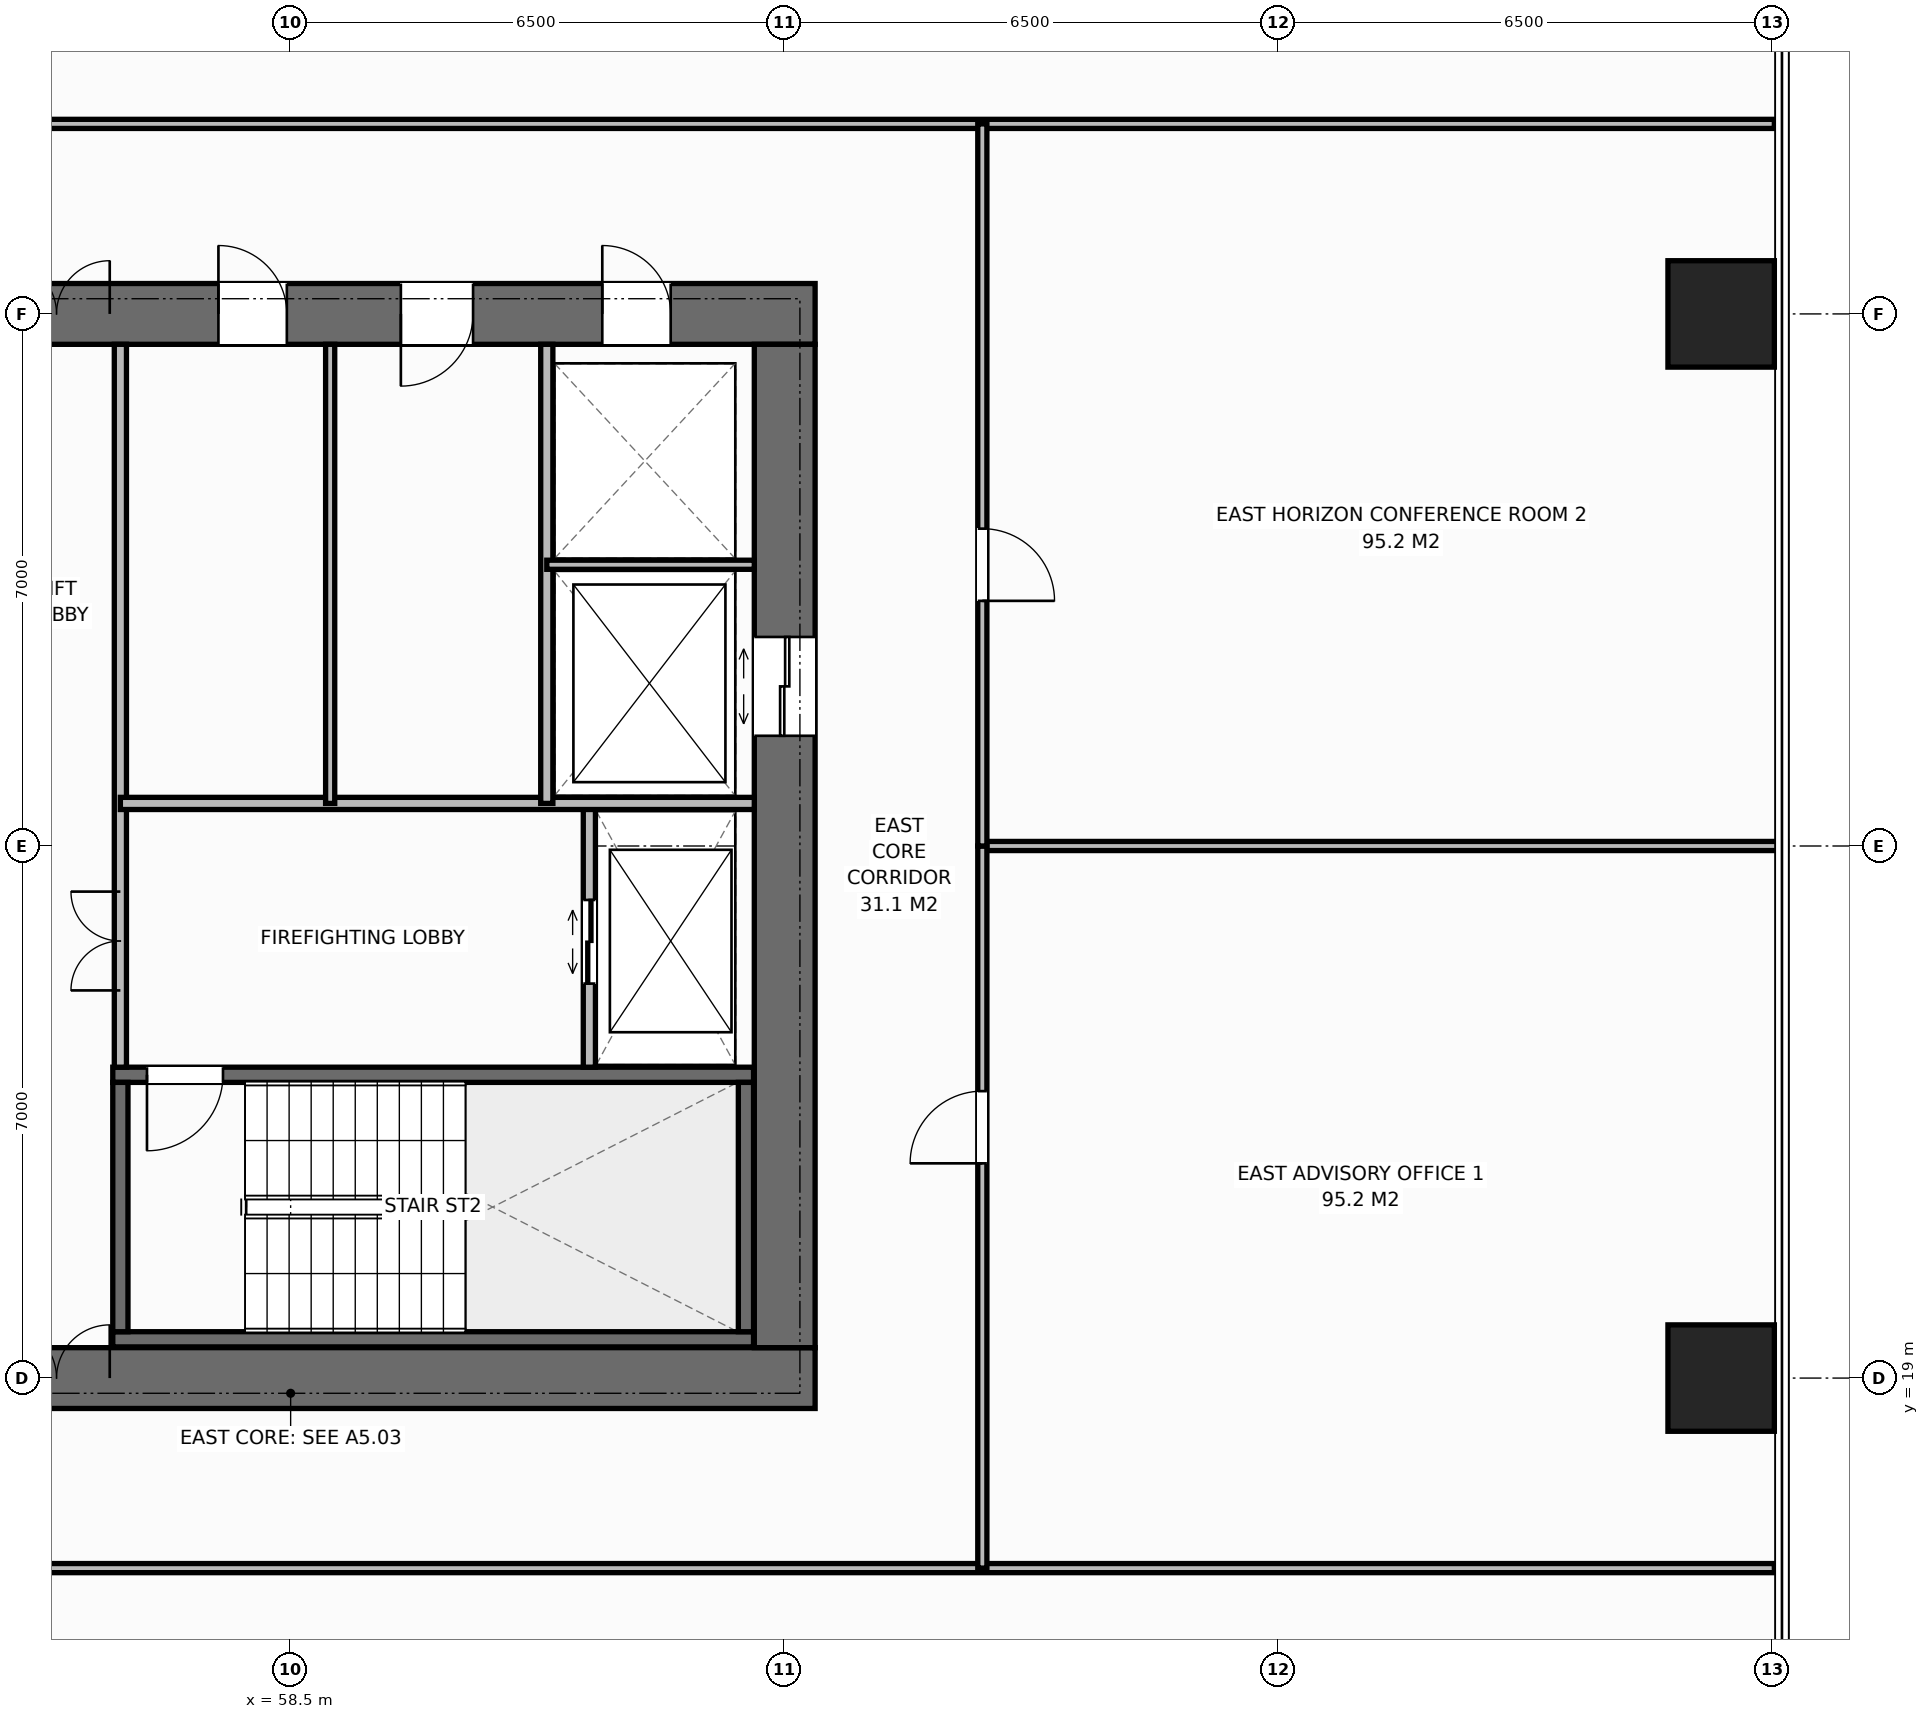
"""IFC4 building model, lengths in metres.
Left out: names, types, materials, properties, quantities, classifications, styles, units other than length and angle.
Written with IfcOpenShell. Run it as: python <this file> out.ifc"""

import sys

from ifc_helpers import new_model, si_unit, direction, frame, frame_2d, origin, origin_2d, place, context, subcontext, project, spatial, rectangle, extrude, element, fill, save


model = new_model("IFC4")
c1 = context("Model", 3, precision=1e-05, world=origin(), true_north=direction((0.0, 1.0)))
c2 = subcontext(c1, "Body", "Model", "MODEL_VIEW")
j1 = project(units=[si_unit("LENGTHUNIT", "METRE"), si_unit("PLANEANGLEUNIT", "RADIAN")], contexts=[c1])
p1 = place(None, origin())
s1 = spatial("IfcSite", under=j1, at=p1, CompositionType="ELEMENT")
p2 = place(p1, origin())
s2 = spatial("IfcBuilding", under=s1, at=p2, CompositionType="ELEMENT")
p3 = place(p2, frame((0.0, 0.0, 35.4)))
s3 = spatial("IfcBuildingStorey", under=s2, at=p3, CompositionType="ELEMENT", Elevation=35.4)
p4 = place(p3, frame((51.6, 19.0, 0.0), z_axis=(0.0, 0.0, 1.0), x_axis=(1.0, 0.0, 0.0)))
e1 = element("IfcWall", 1, at=p4, inside=s3, PredefinedType="SHEAR", context=c2, shape_type="SweptSolid", body=[
    extrude(rectangle(XDim=13.8, YDim=0.8, at=frame_2d((6.9, 0.0))), origin(), (0.0, 0.0, 1.0), 3.8),
])
p5 = place(p4, frame((3.12, 0.0, 0.0)))
e2 = element("IfcOpeningElement", 2, at=p5, cuts=e1, PredefinedType="OPENING", context=c2, shape_type="SweptSolid", body=[
    extrude(rectangle(XDim=1.4, YDim=2.2, at=frame_2d((0.7, 1.1))), frame((0.0, 0.41, 0.0), z_axis=(0.0, -1.0, 0.0), x_axis=(1.0, 0.0, 0.0)), (0.0, 0.0, 1.0), 0.82),
])
p6 = place(p3, frame((51.6, 33.0, 0.0), z_axis=(0.0, 0.0, 1.0), x_axis=(1.0, 0.0, 0.0)))
e3 = element("IfcWall", 3, at=p6, inside=s3, PredefinedType="SHEAR", context=c2, shape_type="SweptSolid", body=[
    extrude(rectangle(XDim=13.8, YDim=0.8, at=frame_2d((6.9, 0.0))), origin(), (0.0, 0.0, 1.0), 3.8),
])
p7 = place(p6, frame((3.12, 0.0, 0.0)))
e4 = element("IfcOpeningElement", 4, at=p7, cuts=e3, PredefinedType="OPENING", context=c2, shape_type="SweptSolid", body=[
    extrude(rectangle(XDim=1.4, YDim=2.2, at=frame_2d((0.7, 1.1))), frame((0.0, 0.41, 0.0), z_axis=(0.0, -1.0, 0.0), x_axis=(1.0, 0.0, 0.0)), (0.0, 0.0, 1.0), 0.82),
])
p8 = place(p6, frame((11.0, 0.0, 0.0)))
e5 = element("IfcOpeningElement", 5, at=p8, cuts=e3, PredefinedType="OPENING", context=c2, shape_type="SweptSolid", body=[
    extrude(rectangle(XDim=0.9, YDim=2.15, at=frame_2d((0.45, 1.075))), frame((0.0, 0.41, 0.0), z_axis=(0.0, -1.0, 0.0), x_axis=(1.0, 0.0, 0.0)), (0.0, 0.0, 1.0), 0.82),
])
p9 = place(p6, frame((5.95, 0.0, 0.0)))
e6 = element("IfcOpeningElement", 6, at=p9, cuts=e3, PredefinedType="OPENING", context=c2, shape_type="SweptSolid", body=[
    extrude(rectangle(XDim=0.9, YDim=2.15, at=frame_2d((0.45, 1.075))), frame((0.0, 0.41, 0.0), z_axis=(0.0, -1.0, 0.0), x_axis=(1.0, 0.0, 0.0)), (0.0, 0.0, 1.0), 0.82),
])
p10 = place(p6, frame((8.35, 0.0, 0.0)))
e7 = element("IfcOpeningElement", 7, at=p10, cuts=e3, PredefinedType="OPENING", context=c2, shape_type="SweptSolid", body=[
    extrude(rectangle(XDim=0.95, YDim=2.15, at=frame_2d((0.475, 1.075))), frame((0.0, 0.41, 0.0), z_axis=(0.0, -1.0, 0.0), x_axis=(1.0, 0.0, 0.0)), (0.0, 0.0, 1.0), 0.82),
])
p11 = place(p3, frame((65.0, 19.4, 0.0), z_axis=(0.0, 0.0, 1.0), x_axis=(0.0, 1.0, 0.0)))
e8 = element("IfcWall", 8, at=p11, inside=s3, PredefinedType="SHEAR", context=c2, shape_type="SweptSolid", body=[
    extrude(rectangle(XDim=13.2, YDim=0.8, at=frame_2d((6.6, 0.0))), origin(), (0.0, 0.0, 1.0), 3.8),
])
p12 = place(p11, frame((8.05, 0.0, 0.0)))
e9 = element("IfcOpeningElement", 9, at=p12, cuts=e8, PredefinedType="OPENING", context=c2, shape_type="SweptSolid", body=[
    extrude(rectangle(XDim=1.3, YDim=2.2, at=frame_2d((0.65, 1.1))), frame((0.0, 0.41, 0.0), z_axis=(0.0, -1.0, 0.0), x_axis=(1.0, 0.0, 0.0)), (0.0, 0.0, 1.0), 0.82),
])
p13 = place(p3, frame((56.16, 19.51, 0.0), z_axis=(0.0, 0.0, 1.0), x_axis=(1.0, 0.0, 0.0)))
e10 = element("IfcWall", 10, at=p13, inside=s3, PredefinedType="SHEAR", context=c2, shape_type="SweptSolid", body=[
    extrude(rectangle(XDim=8.43, YDim=0.2, at=frame_2d((4.215, 0.0))), origin(), (0.0, 0.0, 1.0), 3.8),
])
p14 = place(p3, frame((56.16, 22.99, 0.0), z_axis=(0.0, 0.0, 1.0), x_axis=(1.0, 0.0, 0.0)))
e11 = element("IfcWall", 11, at=p14, inside=s3, PredefinedType="SHEAR", context=c2, shape_type="SweptSolid", body=[
    extrude(rectangle(XDim=8.43, YDim=0.2, at=frame_2d((4.215, 0.0))), origin(), (0.0, 0.0, 1.0), 3.8),
])
p15 = place(p14, frame((0.45, 0.0, 0.0)))
e12 = element("IfcOpeningElement", 12, at=p15, cuts=e11, PredefinedType="OPENING", context=c2, shape_type="SweptSolid", body=[
    extrude(rectangle(XDim=1.0, YDim=2.15, at=frame_2d((0.5, 1.075))), frame((0.0, 0.11, 0.0), z_axis=(0.0, -1.0, 0.0), x_axis=(1.0, 0.0, 0.0)), (0.0, 0.0, 1.0), 0.22),
])
for number, where, z_axis, x_axis in (
    (13, (56.26, 19.61, 0.0), (0.0, 0.0, 1.0), (0.0, 1.0, 0.0)),
    (14, (64.49, 19.61, 0.0), (0.0, 0.0, 1.0), (0.0, 1.0, 0.0)),
):
    element("IfcWall", number, at=place(p3, frame(where, z_axis=z_axis, x_axis=x_axis)), inside=s3, PredefinedType="SHEAR", context=c2, shape_type="SweptSolid", body=[
        extrude(rectangle(XDim=3.28, YDim=0.2, at=frame_2d((1.64, 0.0))), origin(), (0.0, 0.0, 1.0), 3.8),
    ])
for number, where, z_axis, x_axis in (
    (15, (77.32, 19.0, 0.0), (0.0, 0.0, 1.0), (1.0, 0.0, 0.0)),
    (16, (77.32, 33.0, 0.0), (0.0, 0.0, 1.0), (1.0, 0.0, 0.0)),
):
    element("IfcColumn", number, at=place(p3, frame(where, z_axis=z_axis, x_axis=x_axis)), inside=s3, PredefinedType="COLUMN", context=c2, shape_type="SweptSolid", body=[
        extrude(rectangle(XDim=1.4, YDim=1.4, at=origin_2d()), origin(), (0.0, 0.0, 1.0), 3.8),
    ])
p16 = place(p3, frame((56.26, 23.09, 0.0), z_axis=(0.0, 0.0, 1.0), x_axis=(0.0, 1.0, 0.0)))
e17 = element("IfcWall", 17, at=p16, inside=s3, PredefinedType="STANDARD", context=c2, shape_type="SweptSolid", body=[
    extrude(rectangle(XDim=9.51, YDim=0.16, at=frame_2d((4.755, 0.0))), origin(), (0.0, 0.0, 1.0), 3.55),
])
p17 = place(p16, frame((1.01, 0.0, 0.0)))
e18 = element("IfcOpeningElement", 18, at=p17, cuts=e17, PredefinedType="OPENING", context=c2, shape_type="SweptSolid", body=[
    extrude(rectangle(XDim=1.3, YDim=2.2, at=frame_2d((0.65, 1.1))), frame((0.0, 0.09, 0.0), z_axis=(0.0, -1.0, 0.0), x_axis=(1.0, 0.0, 0.0)), (0.0, 0.0, 1.0), 0.18),
])
p18 = place(p3, frame((62.43, 23.09, 0.0), z_axis=(0.0, 0.0, 1.0), x_axis=(0.0, 1.0, 0.0)))
e19 = element("IfcWall", 19, at=p18, inside=s3, PredefinedType="STANDARD", context=c2, shape_type="SweptSolid", body=[
    extrude(rectangle(XDim=3.47, YDim=0.16, at=frame_2d((1.735, 0.0))), origin(), (0.0, 0.0, 1.0), 3.55),
])
p19 = place(p18, frame((1.1, 0.0, 0.0)))
e20 = element("IfcOpeningElement", 20, at=p19, cuts=e19, PredefinedType="OPENING", context=c2, shape_type="SweptSolid", body=[
    extrude(rectangle(XDim=1.1, YDim=2.2, at=frame_2d((0.55, 1.1))), frame((0.0, 0.09, 0.0), z_axis=(0.0, -1.0, 0.0), x_axis=(1.0, 0.0, 0.0)), (0.0, 0.0, 1.0), 0.18),
])
p20 = place(p3, frame((56.26, 26.56, 0.0), z_axis=(0.0, 0.0, 1.0), x_axis=(1.0, 0.0, 0.0)))
e21 = element("IfcWall", 21, at=p20, inside=s3, PredefinedType="STANDARD", context=c2, shape_type="SweptSolid", body=[
    extrude(rectangle(XDim=8.34, YDim=0.16, at=frame_2d((4.17, 0.0))), origin(), (0.0, 0.0, 1.0), 3.55),
])
p21 = place(p3, frame((61.87, 26.56, 0.0), z_axis=(0.0, 0.0, 1.0), x_axis=(0.0, 1.0, 0.0)))
e22 = element("IfcWall", 22, at=p21, inside=s3, PredefinedType="STANDARD", context=c2, shape_type="SweptSolid", body=[
    extrude(rectangle(XDim=6.04, YDim=0.16, at=frame_2d((3.02, 0.0))), origin(), (0.0, 0.0, 1.0), 3.55),
])
p22 = place(p3, frame((61.87, 29.7, 0.0), z_axis=(0.0, 0.0, 1.0), x_axis=(1.0, 0.0, 0.0)))
e23 = element("IfcWall", 23, at=p22, inside=s3, PredefinedType="PARTITIONING", context=c2, shape_type="SweptSolid", body=[
    extrude(rectangle(XDim=2.73, YDim=0.12, at=frame_2d((1.365, 0.0))), origin(), (0.0, 0.0, 1.0), 3.55),
])
p23 = place(p3, frame((59.02, 26.56, 0.0), z_axis=(0.0, 0.0, 1.0), x_axis=(0.0, 1.0, 0.0)))
e24 = element("IfcWall", 24, at=p23, inside=s3, PredefinedType="PARTITIONING", context=c2, shape_type="SweptSolid", body=[
    extrude(rectangle(XDim=6.04, YDim=0.12, at=frame_2d((3.02, 0.0))), origin(), (0.0, 0.0, 1.0), 3.55),
])
p24 = place(p3, frame((32.46, 35.5, 0.0), z_axis=(0.0, 0.0, 1.0), x_axis=(1.0, 0.0, 0.0)))
e25 = element("IfcWall", 25, at=p24, inside=s3, PredefinedType="PARTITIONING", context=c2, shape_type="SweptSolid", body=[
    extrude(rectangle(XDim=45.56, YDim=0.12, at=frame_2d((22.78, 0.0))), origin(), (0.0, 0.0, 1.0), 3.55),
])
p25 = place(p24, frame((17.095, 0.0, 0.0)))
e26 = element("IfcOpeningElement", 26, at=p25, cuts=e25, PredefinedType="OPENING", context=c2, shape_type="SweptSolid", body=[
    extrude(rectangle(XDim=0.95, YDim=2.15, at=frame_2d((0.475, 1.075))), frame((0.0, 0.07, 0.0), z_axis=(0.0, -1.0, 0.0), x_axis=(1.0, 0.0, 0.0)), (0.0, 0.0, 1.0), 0.14),
])
p26 = place(p3, frame((40.043, 16.5, 0.0), z_axis=(0.0, 0.0, 1.0), x_axis=(1.0, 0.0, 0.0)))
e27 = element("IfcWall", 27, at=p26, inside=s3, PredefinedType="PARTITIONING", context=c2, shape_type="SweptSolid", body=[
    extrude(rectangle(XDim=37.977, YDim=0.12, at=frame_2d((18.988, 0.0))), origin(), (0.0, 0.0, 1.0), 3.55),
])
p27 = place(p26, frame((13.303, 0.0, 0.0)))
e28 = element("IfcOpeningElement", 28, at=p27, cuts=e27, PredefinedType="OPENING", context=c2, shape_type="SweptSolid", body=[
    extrude(rectangle(XDim=0.95, YDim=2.15, at=frame_2d((0.475, 1.075))), frame((0.0, 0.07, 0.0), z_axis=(0.0, -1.0, 0.0), x_axis=(1.0, 0.0, 0.0)), (0.0, 0.0, 1.0), 0.14),
])
p28 = place(p3, frame((67.6, 26.0, 0.0), z_axis=(0.0, 0.0, 1.0), x_axis=(1.0, 0.0, 0.0)))
e29 = element("IfcWall", 29, at=p28, inside=s3, PredefinedType="PARTITIONING", context=c2, shape_type="SweptSolid", body=[
    extrude(rectangle(XDim=10.58, YDim=0.12, at=frame_2d((5.29, 0.0))), origin(), (0.0, 0.0, 1.0), 3.55),
])
p29 = place(p3, frame((67.6, 16.5, 0.0), z_axis=(0.0, 0.0, 1.0), x_axis=(0.0, 1.0, 0.0)))
e30 = element("IfcWall", 30, at=p29, inside=s3, PredefinedType="PARTITIONING", context=c2, shape_type="SweptSolid", body=[
    extrude(rectangle(XDim=9.5, YDim=0.12, at=frame_2d((4.75, 0.0))), origin(), (0.0, 0.0, 1.0), 3.55),
])
p30 = place(p29, frame((5.325, 0.0, 0.0)))
e31 = element("IfcOpeningElement", 31, at=p30, cuts=e30, PredefinedType="OPENING", context=c2, shape_type="SweptSolid", body=[
    extrude(rectangle(XDim=0.95, YDim=2.15, at=frame_2d((0.475, 1.075))), frame((0.0, 0.07, 0.0), z_axis=(0.0, -1.0, 0.0), x_axis=(1.0, 0.0, 0.0)), (0.0, 0.0, 1.0), 0.14),
])
p31 = place(p3, frame((67.6, 26.0, 0.0), z_axis=(0.0, 0.0, 1.0), x_axis=(0.0, 1.0, 0.0)))
e32 = element("IfcWall", 32, at=p31, inside=s3, PredefinedType="PARTITIONING", context=c2, shape_type="SweptSolid", body=[
    extrude(rectangle(XDim=9.5, YDim=0.12, at=frame_2d((4.75, 0.0))), origin(), (0.0, 0.0, 1.0), 3.55),
])
p32 = place(p31, frame((3.225, 0.0, 0.0)))
e33 = element("IfcOpeningElement", 33, at=p32, cuts=e32, PredefinedType="OPENING", context=c2, shape_type="SweptSolid", body=[
    extrude(rectangle(XDim=0.95, YDim=2.15, at=frame_2d((0.475, 1.075))), frame((0.0, 0.07, 0.0), z_axis=(0.0, -1.0, 0.0), x_axis=(1.0, 0.0, 0.0)), (0.0, 0.0, 1.0), 0.14),
])
p33 = place(p5, origin())
e34 = element("IfcDoor", 34, at=p33, inside=s3, OperationType="DOUBLE_DOOR_SINGLE_SWING", PredefinedType="DOOR", context=c2, shape_type="SweptSolid", body=[
    extrude(rectangle(XDim=1.4, YDim=2.2, at=frame_2d((0.7, 1.1))), frame((0.0, 0.125, 0.0), z_axis=(0.0, -1.0, 0.0), x_axis=(1.0, 0.0, 0.0)), (0.0, 0.0, 1.0), 0.05),
])
fill(e2, e34)
p34 = place(p7, origin())
e35 = element("IfcDoor", 35, at=p34, inside=s3, OperationType="DOUBLE_DOOR_SINGLE_SWING", PredefinedType="DOOR", context=c2, shape_type="SweptSolid", body=[
    extrude(rectangle(XDim=1.4, YDim=2.2, at=frame_2d((0.7, 1.1))), frame((0.0, -0.075, 0.0), z_axis=(0.0, -1.0, 0.0), x_axis=(1.0, 0.0, 0.0)), (0.0, 0.0, 1.0), 0.05),
])
fill(e4, e35)
p35 = place(p15, origin())
e36 = element("IfcDoor", 36, at=p35, inside=s3, OperationType="SINGLE_SWING_RIGHT", PredefinedType="DOOR", context=c2, shape_type="SweptSolid", body=[
    extrude(rectangle(XDim=1.0, YDim=2.15, at=frame_2d((0.5, 1.075))), frame((0.0, 0.025, 0.0), z_axis=(0.0, -1.0, 0.0), x_axis=(1.0, 0.0, 0.0)), (0.0, 0.0, 1.0), 0.05),
])
fill(e12, e36)
p36 = place(p19, origin())
e37 = element("IfcDoor", 37, at=p36, inside=s3, OperationType="DOUBLE_DOOR_SLIDING", PredefinedType="DOOR", context=c2, shape_type="SweptSolid", body=[
    extrude(rectangle(XDim=1.1, YDim=2.2, at=frame_2d((0.55, 1.1))), frame((0.0, 0.025, 0.0), z_axis=(0.0, -1.0, 0.0), x_axis=(1.0, 0.0, 0.0)), (0.0, 0.0, 1.0), 0.05),
])
fill(e20, e37)
p37 = place(p17, origin())
e38 = element("IfcDoor", 38, at=p37, inside=s3, OperationType="DOUBLE_DOOR_SINGLE_SWING", PredefinedType="DOOR", context=c2, shape_type="SweptSolid", body=[
    extrude(rectangle(XDim=1.3, YDim=2.2, at=frame_2d((0.65, 1.1))), frame((0.0, 0.025, 0.0), z_axis=(0.0, -1.0, 0.0), x_axis=(1.0, 0.0, 0.0)), (0.0, 0.0, 1.0), 0.05),
])
fill(e18, e38)
p38 = place(p12, origin())
e39 = element("IfcDoor", 39, at=p38, inside=s3, OperationType="DOUBLE_DOOR_SLIDING", PredefinedType="DOOR", context=c2, shape_type="SweptSolid", body=[
    extrude(rectangle(XDim=1.3, YDim=2.2, at=frame_2d((0.65, 1.1))), frame((0.0, 0.025, 0.0), z_axis=(0.0, -1.0, 0.0), x_axis=(1.0, 0.0, 0.0)), (0.0, 0.0, 1.0), 0.05),
])
fill(e9, e39)
p39 = place(p8, origin())
e40 = element("IfcDoor", 40, at=p39, inside=s3, OperationType="SINGLE_SWING_LEFT", PredefinedType="DOOR", context=c2, shape_type="SweptSolid", body=[
    extrude(rectangle(XDim=0.9, YDim=2.15, at=frame_2d((0.45, 1.075))), frame((0.0, -0.075, 0.0), z_axis=(0.0, -1.0, 0.0), x_axis=(1.0, 0.0, 0.0)), (0.0, 0.0, 1.0), 0.05),
])
fill(e5, e40)
p40 = place(p9, origin())
e41 = element("IfcDoor", 41, at=p40, inside=s3, OperationType="SINGLE_SWING_LEFT", PredefinedType="DOOR", context=c2, shape_type="SweptSolid", body=[
    extrude(rectangle(XDim=0.9, YDim=2.15, at=frame_2d((0.45, 1.075))), frame((0.0, -0.075, 0.0), z_axis=(0.0, -1.0, 0.0), x_axis=(1.0, 0.0, 0.0)), (0.0, 0.0, 1.0), 0.05),
])
fill(e6, e41)
p41 = place(p10, origin())
e42 = element("IfcDoor", 42, at=p41, inside=s3, OperationType="SINGLE_SWING_RIGHT", PredefinedType="DOOR", context=c2, shape_type="SweptSolid", body=[
    extrude(rectangle(XDim=0.95, YDim=2.15, at=frame_2d((0.475, 1.075))), frame((0.0, -0.075, 0.0), z_axis=(0.0, -1.0, 0.0), x_axis=(1.0, 0.0, 0.0)), (0.0, 0.0, 1.0), 0.05),
])
fill(e7, e42)
p42 = place(p30, origin())
e43 = element("IfcDoor", 43, at=p42, inside=s3, OperationType="SINGLE_SWING_LEFT", PredefinedType="DOOR", context=c2, shape_type="SweptSolid", body=[
    extrude(rectangle(XDim=0.95, YDim=2.15, at=frame_2d((0.475, 1.075))), frame((0.0, 0.025, 0.0), z_axis=(0.0, -1.0, 0.0), x_axis=(1.0, 0.0, 0.0)), (0.0, 0.0, 1.0), 0.05),
])
fill(e31, e43)
p43 = place(p32, origin())
e44 = element("IfcDoor", 44, at=p43, inside=s3, OperationType="SINGLE_SWING_RIGHT", PredefinedType="DOOR", context=c2, shape_type="SweptSolid", body=[
    extrude(rectangle(XDim=0.95, YDim=2.15, at=frame_2d((0.475, 1.075))), frame((0.0, 0.025, 0.0), z_axis=(0.0, -1.0, 0.0), x_axis=(1.0, 0.0, 0.0)), (0.0, 0.0, 1.0), 0.05),
])
fill(e33, e44)
save(model, sys.argv[1])
